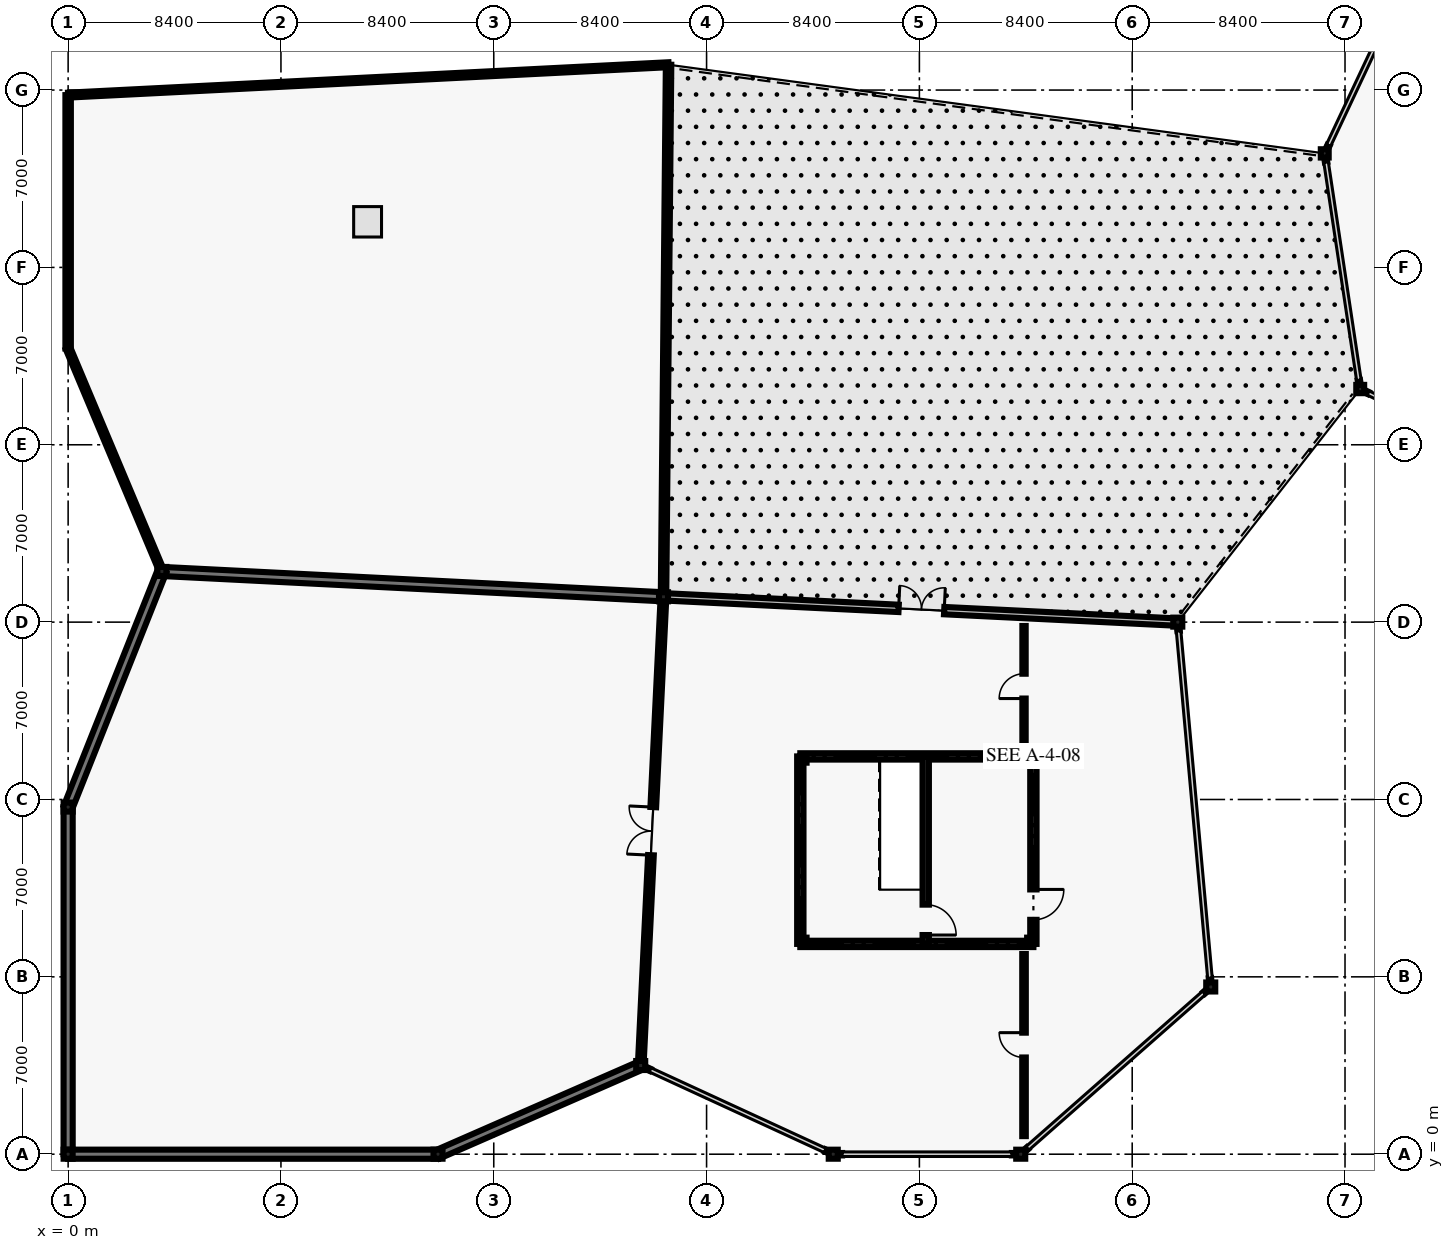
"""IFC4 building model, lengths in metres.
Left out: names, types, materials, properties, quantities, classifications, styles, units other than length and angle.
Written with IfcOpenShell. Run it as: python <this file> out.ifc"""

import sys

from ifc_helpers import new_model, si_unit, direction, frame, frame_2d, origin, origin_2d, place, context, subcontext, project, spatial, rectangle, hollow_circle, i_section, extrude, element, fill, save


model = new_model("IFC4")
c1 = context("Model", 3, precision=1e-05, world=origin(), true_north=direction((0.0, 1.0)))
c2 = subcontext(c1, "Body", "Model", "MODEL_VIEW")
j1 = project(units=[si_unit("LENGTHUNIT", "METRE"), si_unit("PLANEANGLEUNIT", "RADIAN")], contexts=[c1])
p1 = place(None, origin())
s1 = spatial("IfcSite", under=j1, at=p1, CompositionType="ELEMENT")
p2 = place(p1, origin())
s2 = spatial("IfcBuilding", under=s1, at=p2, CompositionType="ELEMENT")
p3 = place(p2, frame((0.0, 0.0, 10.2)))
s3 = spatial("IfcBuildingStorey", under=s2, at=p3, CompositionType="ELEMENT", Elevation=10.2)
for number, where, z_axis, x_axis in (
    (1, (0.0, 0.0, 0.0), (0.0, 0.0, 1.0), (1.0, 0.0, 0.0)),
    (2, (0.0, 13.7, 0.0), (0.0, 0.0, 1.0), (1.0, 0.0, 0.0)),
    (3, (3.7, 23.0, 0.0), (0.0, 0.0, 1.0), (1.0, 0.0, 0.0)),
    (4, (14.6, 0.0, 0.0), (0.0, 0.0, 1.0), (1.0, 0.0, 0.0)),
    (5, (22.6, 3.5, 0.0), (0.0, 0.0, 1.0), (1.0, 0.0, 0.0)),
    (6, (23.5, 22.0, 0.0), (0.0, 0.0, 1.0), (1.0, 0.0, 0.0)),
    (7, (30.2, 0.0, 0.0), (0.0, 0.0, 1.0), (1.0, 0.0, 0.0)),
    (8, (37.6, 0.0, 0.0), (0.0, 0.0, 1.0), (1.0, 0.0, 0.0)),
    (9, (43.8, 21.0, 0.0), (0.0, 0.0, 1.0), (1.0, 0.0, 0.0)),
    (10, (45.1, 6.6, 0.0), (0.0, 0.0, 1.0), (1.0, 0.0, 0.0)),
):
    element("IfcColumn", number, at=place(p3, frame(where, z_axis=z_axis, x_axis=x_axis)), inside=s3, PredefinedType="COLUMN", context=c2, shape_type="SweptSolid", body=[
        extrude(hollow_circle(Radius=0.178, WallThickness=0.013, at=origin_2d()), origin(), (0.0, 0.0, 1.0), 4.8),
    ])
for number, where, z_axis, x_axis in (
    (11, (49.6, 39.5, 0.0), (0.0, 0.0, 1.0), (1.0, 0.0, 0.0)),
    (12, (51.0, 30.2, 0.0), (0.0, 0.0, 1.0), (1.0, 0.0, 0.0)),
):
    element("IfcColumn", number, at=place(p3, frame(where, z_axis=z_axis, x_axis=x_axis)), inside=s3, PredefinedType="COLUMN", context=c2, shape_type="SweptSolid", body=[
        extrude(i_section(OverallWidth=0.311, OverallDepth=0.327, WebThickness=0.016, FlangeThickness=0.025, FilletRadius=0.017, at=origin_2d()), origin(), (0.0, 0.0, 1.0), 4.8),
    ])
for number, where, z_axis, x_axis in (
    (13, (29.02, 8.42, 0.0), (0.0, 0.0, 1.0), (1.0, 0.0, 0.0)),
    (14, (37.98, 8.42, 0.0), (0.0, 0.0, 1.0), (1.0, 0.0, 0.0)),
    (15, (37.98, 15.58, 0.0), (0.0, 0.0, 1.0), (1.0, 0.0, 0.0)),
    (16, (29.02, 15.58, 0.0), (0.0, 0.0, 1.0), (1.0, 0.0, 0.0)),
):
    element("IfcColumn", number, at=place(p3, frame(where, z_axis=z_axis, x_axis=x_axis)), inside=s3, PredefinedType="COLUMN", context=c2, shape_type="SweptSolid", body=[
        extrude(i_section(OverallWidth=0.254, OverallDepth=0.254, WebThickness=0.009, FlangeThickness=0.014, FilletRadius=0.013, at=origin_2d()), origin(), (0.0, 0.0, 1.0), 4.8),
    ])
for number, where, z_axis, x_axis in (
    (17, (50.994, 30.242, 0.0), (0.0, 0.0, 1.0), (-0.149, 0.989, 0.0)),
    (18, (49.652, 39.154, 0.0), (0.0, 0.0, 1.0), (-0.15, 0.989, 0.0)),
):
    element("IfcWall", number, at=place(p3, frame(where, z_axis=z_axis, x_axis=x_axis)), inside=s3, PredefinedType="SOLIDWALL", context=c2, shape_type="SweptSolid", body=[
        extrude(rectangle(XDim=0.307, YDim=0.095, at=frame_2d((0.154, 0.0))), origin(), (0.0, 0.0, 1.0), 3.62),
    ])
p4 = place(p3, frame((51.314, 30.045, 0.0), z_axis=(0.0, 0.0, 1.0), x_axis=(-0.896952807524, 0.44212629539, 0.0)))
e19 = element("IfcWall", 19, at=p4, inside=s3, PredefinedType="SOLIDWALL", context=c2, shape_type="SweptSolid", body=[
    extrude(rectangle(XDim=0.308, YDim=0.095, at=frame_2d((0.154, 0.0))), origin(), (0.0, 0.0, 1.0), 3.62),
])
p5 = place(p3, frame((49.618, 39.538, 0.0), z_axis=(0.0, 0.0, 1.0), x_axis=(0.425529884469, 0.904944372558, 0.0)))
e20 = element("IfcWall", 20, at=p5, inside=s3, PredefinedType="SOLIDWALL", context=c2, shape_type="SweptSolid", body=[
    extrude(rectangle(XDim=0.308, YDim=0.095, at=frame_2d((0.154, 0.0))), origin(), (0.0, 0.0, 1.0), 3.62),
])
p6 = place(p3, frame((3.7, 23.0, 0.0), z_axis=(0.0, 0.0, 1.0), x_axis=(0.998726796939, -0.050445862825, 0.0)))
e21 = element("IfcWall", 21, at=p6, inside=s3, PredefinedType="SOLIDWALL", context=c2, shape_type="SweptSolid", body=[
    extrude(rectangle(XDim=19.765, YDim=0.36, at=frame_2d((9.883, 0.0))), origin(), (0.0, 0.0, 1.0), 3.62),
])
p7 = place(p3, frame((0.0, 13.7, 0.0), z_axis=(0.0, 0.0, 1.0), x_axis=(0.369661561468, 0.929166470538, 0.0)))
e22 = element("IfcWall", 22, at=p7, inside=s3, PredefinedType="SOLIDWALL", context=c2, shape_type="SweptSolid", body=[
    extrude(rectangle(XDim=10.009, YDim=0.36, at=frame_2d((5.004, 0.0))), origin(), (0.0, 0.0, 1.0), 3.62),
])
p8 = place(p3, frame((0.0, 0.0, 0.0), z_axis=(0.0, 0.0, 1.0), x_axis=(0.0, 1.0, 0.0)))
e23 = element("IfcWall", 23, at=p8, inside=s3, PredefinedType="SOLIDWALL", context=c2, shape_type="SweptSolid", body=[
    extrude(rectangle(XDim=13.7, YDim=0.36, at=frame_2d((6.85, 0.0))), origin(), (0.0, 0.0, 1.0), 3.62),
])
p9 = place(p3, frame((14.6, 0.0, 0.0), z_axis=(0.0, 0.0, 1.0), x_axis=(-1.0, 0.0, 0.0)))
e24 = element("IfcWall", 24, at=p9, inside=s3, PredefinedType="SOLIDWALL", context=c2, shape_type="SweptSolid", body=[
    extrude(rectangle(XDim=14.6, YDim=0.36, at=frame_2d((7.3, 0.0))), origin(), (0.0, 0.0, 1.0), 3.62),
])
p10 = place(p3, frame((22.545, 3.476, 0.0), z_axis=(0.0, 0.0, 1.0), x_axis=(-0.916148288852, -0.400839510069, 0.0)))
e25 = element("IfcWall", 25, at=p10, inside=s3, PredefinedType="SOLIDWALL", context=c2, shape_type="SweptSolid", body=[
    extrude(rectangle(XDim=8.672, YDim=0.36, at=frame_2d((4.336, 0.0))), origin(), (0.0, 0.0, 1.0), 3.62),
])
for number, where, z_axis, x_axis in (
    (26, (30.162, 0.018, 0.0), (0.0, 0.0, 1.0), (-0.91, 0.416, 0.0)),
    (27, (22.972, 3.329, 0.0), (0.0, 0.0, 1.0), (-0.91, 0.416, 0.0)),
):
    element("IfcWall", number, at=place(p3, frame(where, z_axis=z_axis, x_axis=x_axis)), inside=s3, PredefinedType="SOLIDWALL", context=c2, shape_type="SweptSolid", body=[
        extrude(rectangle(XDim=0.308, YDim=0.095, at=frame_2d((0.154, 0.0))), origin(), (0.0, 0.0, 1.0), 3.62),
    ])
for number, where, z_axis, x_axis in (
    (28, (37.558, 0.0, 0.0), (0.0, 0.0, 1.0), (-1.0, 0.0, 0.0)),
    (29, (30.55, 0.0, 0.0), (0.0, 0.0, 1.0), (-1.0, 0.0, 0.0)),
):
    element("IfcWall", number, at=place(p3, frame(where, z_axis=z_axis, x_axis=x_axis)), inside=s3, PredefinedType="SOLIDWALL", context=c2, shape_type="SweptSolid", body=[
        extrude(rectangle(XDim=0.308, YDim=0.095, at=frame_2d((0.154, 0.0))), origin(), (0.0, 0.0, 1.0), 3.62),
    ])
p11 = place(p3, frame((45.068, 6.572, 0.0), z_axis=(0.0, 0.0, 1.0), x_axis=(-0.75124833206, -0.660019653932, 0.0)))
e30 = element("IfcWall", 30, at=p11, inside=s3, PredefinedType="SOLIDWALL", context=c2, shape_type="SweptSolid", body=[
    extrude(rectangle(XDim=0.308, YDim=0.095, at=frame_2d((0.154, 0.0))), origin(), (0.0, 0.0, 1.0), 3.62),
])
p12 = place(p3, frame((37.863, 0.231, 0.0), z_axis=(0.0, 0.0, 1.0), x_axis=(-0.751296149946, -0.659965222627, 0.0)))
e31 = element("IfcWall", 31, at=p12, inside=s3, PredefinedType="SOLIDWALL", context=c2, shape_type="SweptSolid", body=[
    extrude(rectangle(XDim=0.307, YDim=0.095, at=frame_2d((0.154, 0.0))), origin(), (0.0, 0.0, 1.0), 3.62),
])
p13 = place(p3, frame((43.804, 20.958, 0.0), z_axis=(0.0, 0.0, 1.0), x_axis=(0.087893810296, -0.996129850025, 0.0)))
e32 = element("IfcWall", 32, at=p13, inside=s3, PredefinedType="SOLIDWALL", context=c2, shape_type="SweptSolid", body=[
    extrude(rectangle(XDim=0.308, YDim=0.095, at=frame_2d((0.154, 0.0))), origin(), (0.0, 0.0, 1.0), 3.62),
])
p14 = place(p3, frame((45.069, 6.949, 0.0), z_axis=(0.0, 0.0, 1.0), x_axis=(0.087176781459, -0.996192857219, 0.0)))
e33 = element("IfcWall", 33, at=p14, inside=s3, PredefinedType="SOLIDWALL", context=c2, shape_type="SweptSolid", body=[
    extrude(rectangle(XDim=0.308, YDim=0.095, at=frame_2d((0.154, 0.0))), origin(), (0.0, 0.0, 1.0), 3.62),
])
p15 = place(p3, frame((23.56, 21.997, 0.0), z_axis=(0.0, 0.0, 1.0), x_axis=(0.998788812439, -0.049202724992, 0.0)))
e34 = element("IfcWall", 34, at=p15, inside=s3, PredefinedType="SOLIDWALL", context=c2, shape_type="SweptSolid", body=[
    extrude(rectangle(XDim=20.265, YDim=0.29, at=frame_2d((10.132, 0.0))), origin(), (0.0, 0.0, 1.0), 3.62),
])
p16 = place(p15, frame((9.232, 0.0, 0.0)))
e35 = element("IfcOpeningElement", 35, at=p16, cuts=e34, PredefinedType="OPENING", context=c2, shape_type="SweptSolid", body=[
    extrude(rectangle(XDim=1.8, YDim=2.25, at=frame_2d((0.9, 1.125))), frame((0.0, 0.155, 0.0), z_axis=(0.0, -1.0, 0.0), x_axis=(1.0, 0.0, 0.0)), (0.0, 0.0, 1.0), 0.31),
])
p17 = place(p3, frame((23.7, 43.0, 0.0), z_axis=(0.0, 0.0, 1.0), x_axis=(-0.998720712235, -0.050566183885, 0.0)))
e36 = element("IfcWall", 36, at=p17, inside=s3, PredefinedType="PARAPET", context=c2, shape_type="SweptSolid", body=[
    extrude(rectangle(XDim=23.73, YDim=0.195, at=frame_2d((11.865, 0.0))), origin(), (0.0, 0.0, 1.0), 0.95),
])
p18 = place(p3, frame((0.0, 41.8, 0.0), z_axis=(0.0, 0.0, 1.0), x_axis=(0.0, -1.0, 0.0)))
e37 = element("IfcWall", 37, at=p18, inside=s3, PredefinedType="PARAPET", context=c2, shape_type="SweptSolid", body=[
    extrude(rectangle(XDim=10.0, YDim=0.215, at=frame_2d((5.0, 0.0))), origin(), (0.0, 0.0, 1.0), 0.95),
])
p19 = place(p3, frame((0.0, 31.8, 0.0), z_axis=(0.0, 0.0, 1.0), x_axis=(0.387558181878, -0.921845244962, 0.0)))
e38 = element("IfcWall", 38, at=p19, inside=s3, PredefinedType="PARAPET", context=c2, shape_type="SweptSolid", body=[
    extrude(rectangle(XDim=9.366, YDim=0.195, at=frame_2d((4.683, 0.0))), origin(), (0.0, 0.0, 1.0), 0.95),
])
p20 = place(p3, frame((23.502, 22.18, 0.0), z_axis=(0.0, 0.0, 1.0), x_axis=(0.009509531412, 0.999954783384, 0.0)))
e39 = element("IfcWall", 39, at=p20, inside=s3, PredefinedType="PARAPET", context=c2, shape_type="SweptSolid", body=[
    extrude(rectangle(XDim=20.821, YDim=0.215, at=frame_2d((10.411, 0.0))), origin(), (0.0, 0.0, 1.0), 0.95),
])
p21 = place(p3, frame((22.6, 3.5, 0.0), z_axis=(0.0, 0.0, 1.0), x_axis=(0.048585922438, 0.998819006698, 0.0)))
e40 = element("IfcWall", 40, at=p21, inside=s3, PredefinedType="SOLIDWALL", context=c2, shape_type="SweptSolid", body=[
    extrude(rectangle(XDim=18.522, YDim=0.225, at=frame_2d((9.261, 0.0))), origin(), (0.0, 0.0, 1.0), 4.02),
])
p22 = place(p21, frame((8.311, 0.0, 0.0)))
e41 = element("IfcOpeningElement", 41, at=p22, cuts=e40, PredefinedType="OPENING", context=c2, shape_type="SweptSolid", body=[
    extrude(rectangle(XDim=1.9, YDim=2.35, at=frame_2d((0.95, 1.175))), frame((0.0, 0.123, 0.0), z_axis=(0.0, -1.0, 0.0), x_axis=(1.0, 0.0, 0.0)), (0.0, 0.0, 1.0), 0.245),
])
p23 = place(p3, frame((37.73, 0.714, 0.0), z_axis=(0.0, 0.0, 1.0), x_axis=(0.0, 1.0, 0.0)))
e42 = element("IfcWall", 42, at=p23, inside=s3, PredefinedType="PARTITIONING", context=c2, shape_type="SweptSolid", body=[
    extrude(rectangle(XDim=7.186, YDim=0.14, at=frame_2d((3.593, 0.0))), origin(), (0.0, 0.0, 1.0), 3.32),
])
p24 = place(p23, frame((3.103, 0.0, 0.0)))
e43 = element("IfcOpeningElement", 43, at=p24, cuts=e42, PredefinedType="OPENING", context=c2, shape_type="SweptSolid", body=[
    extrude(rectangle(XDim=0.98, YDim=2.15, at=frame_2d((0.49, 1.075))), frame((0.0, 0.08, 0.0), z_axis=(0.0, -1.0, 0.0), x_axis=(1.0, 0.0, 0.0)), (0.0, 0.0, 1.0), 0.16),
])
p25 = place(p3, frame((37.73, 16.1, 0.0), z_axis=(0.0, 0.0, 1.0), x_axis=(0.0, 1.0, 0.0)))
e44 = element("IfcWall", 44, at=p25, inside=s3, PredefinedType="PARTITIONING", context=c2, shape_type="SweptSolid", body=[
    extrude(rectangle(XDim=4.748, YDim=0.13, at=frame_2d((2.374, 0.0))), origin(), (0.0, 0.0, 1.0), 3.32),
])
p26 = place(p25, frame((1.884, 0.0, 0.0)))
e45 = element("IfcOpeningElement", 45, at=p26, cuts=e44, PredefinedType="OPENING", context=c2, shape_type="SweptSolid", body=[
    extrude(rectangle(XDim=0.98, YDim=2.15, at=frame_2d((0.49, 1.075))), frame((0.0, 0.075, 0.0), z_axis=(0.0, -1.0, 0.0), x_axis=(1.0, 0.0, 0.0)), (0.0, 0.0, 1.0), 0.15),
])
p27 = place(p3, frame((28.9, 8.3, 0.0), z_axis=(0.0, 0.0, 1.0), x_axis=(0.0, 1.0, 0.0)))
e46 = element("IfcWall", 46, at=p27, inside=s3, PredefinedType="SHEAR", context=c2, shape_type="SweptSolid", body=[
    extrude(rectangle(XDim=7.4, YDim=0.25, at=frame_2d((3.7, 0.0))), origin(), (0.0, 0.0, 1.0), 4.56),
])
for number, where, z_axis, x_axis in (
    (47, (28.9, 15.7, 0.0), (0.0, 0.0, 1.0), (1.0, 0.0, 0.0)),
    (48, (38.1, 8.3, 0.0), (0.0, 0.0, 1.0), (-1.0, 0.0, 0.0)),
):
    element("IfcWall", number, at=place(p3, frame(where, z_axis=z_axis, x_axis=x_axis)), inside=s3, PredefinedType="SHEAR", context=c2, shape_type="SweptSolid", body=[
        extrude(rectangle(XDim=9.2, YDim=0.25, at=frame_2d((4.6, 0.0))), origin(), (0.0, 0.0, 1.0), 4.56),
    ])
p28 = place(p3, frame((38.1, 15.7, 0.0), z_axis=(0.0, 0.0, 1.0), x_axis=(0.0, -1.0, 0.0)))
e49 = element("IfcWall", 49, at=p28, inside=s3, PredefinedType="SHEAR", context=c2, shape_type="SweptSolid", body=[
    extrude(rectangle(XDim=7.4, YDim=0.25, at=frame_2d((3.7, 0.0))), origin(), (0.0, 0.0, 1.0), 4.56),
])
p29 = place(p28, frame((5.25, 0.0, 0.0)))
e50 = element("IfcOpeningElement", 50, at=p29, cuts=e49, PredefinedType="OPENING", context=c2, shape_type="SweptSolid", body=[
    extrude(rectangle(XDim=1.2, YDim=2.2, at=frame_2d((0.6, 1.1))), frame((0.0, 0.135, 0.0), z_axis=(0.0, -1.0, 0.0), x_axis=(1.0, 0.0, 0.0)), (0.0, 0.0, 1.0), 0.27),
])
p30 = place(p3, frame((33.85, 15.7, 0.0), z_axis=(0.0, 0.0, 1.0), x_axis=(0.0, -1.0, 0.0)))
e51 = element("IfcWall", 51, at=p30, inside=s3, PredefinedType="SHEAR", context=c2, shape_type="SweptSolid", body=[
    extrude(rectangle(XDim=7.4, YDim=0.25, at=frame_2d((3.7, 0.0))), origin(), (0.0, 0.0, 1.0), 4.56),
])
p31 = place(p30, frame((5.85, 0.0, 0.0)))
e52 = element("IfcOpeningElement", 52, at=p31, cuts=e51, PredefinedType="OPENING", context=c2, shape_type="SweptSolid", body=[
    extrude(rectangle(XDim=1.2, YDim=2.2, at=frame_2d((0.6, 1.1))), frame((0.0, 0.135, 0.0), z_axis=(0.0, -1.0, 0.0), x_axis=(1.0, 0.0, 0.0)), (0.0, 0.0, 1.0), 0.27),
])
p32 = place(p16, origin())
e53 = element("IfcDoor", 53, at=p32, inside=s3, OperationType="DOUBLE_DOOR_SINGLE_SWING", PredefinedType="DOOR", context=c2, shape_type="SweptSolid", body=[
    extrude(rectangle(XDim=1.8, YDim=2.25, at=frame_2d((0.9, 1.125))), frame((0.0, 0.025, 0.0), z_axis=(0.0, -1.0, 0.0), x_axis=(1.0, 0.0, 0.0)), (0.0, 0.0, 1.0), 0.05),
])
fill(e35, e53)
p33 = place(p3, frame((0.0, 0.0, -0.23)))
p34 = place(p33, frame((11.82, 36.8, 0.0)))
p35 = place(p34, frame((0.0, 0.0, 0.18)))
e54 = element("IfcDoor", 54, at=p35, inside=s3, OperationType="SINGLE_SWING_LEFT", PredefinedType="TRAPDOOR", context=c2, shape_type="SweptSolid", body=[
    extrude(rectangle(XDim=1.1, YDim=1.2, at=origin_2d()), origin(), (0.0, 0.0, 1.0), 0.05),
])
p36 = place(p22, origin())
e55 = element("IfcDoor", 55, at=p36, inside=s3, OperationType="DOUBLE_DOOR_SINGLE_SWING", PredefinedType="DOOR", context=c2, shape_type="SweptSolid", body=[
    extrude(rectangle(XDim=1.9, YDim=2.35, at=frame_2d((0.95, 1.175))), frame((0.0, 0.025, 0.0), z_axis=(0.0, -1.0, 0.0), x_axis=(1.0, 0.0, 0.0)), (0.0, 0.0, 1.0), 0.05),
])
fill(e41, e55)
p37 = place(p24, origin())
e56 = element("IfcDoor", 56, at=p37, inside=s3, OperationType="SINGLE_SWING_RIGHT", PredefinedType="DOOR", context=c2, shape_type="SweptSolid", body=[
    extrude(rectangle(XDim=0.98, YDim=2.15, at=frame_2d((0.49, 1.075))), frame((0.0, 0.025, 0.0), z_axis=(0.0, -1.0, 0.0), x_axis=(1.0, 0.0, 0.0)), (0.0, 0.0, 1.0), 0.05),
])
fill(e43, e56)
p38 = place(p26, origin())
e57 = element("IfcDoor", 57, at=p38, inside=s3, OperationType="SINGLE_SWING_LEFT", PredefinedType="DOOR", context=c2, shape_type="SweptSolid", body=[
    extrude(rectangle(XDim=0.98, YDim=2.15, at=frame_2d((0.49, 1.075))), frame((0.0, 0.025, 0.0), z_axis=(0.0, -1.0, 0.0), x_axis=(1.0, 0.0, 0.0)), (0.0, 0.0, 1.0), 0.05),
])
fill(e45, e57)
p39 = place(p29, origin())
e58 = element("IfcDoor", 58, at=p39, inside=s3, OperationType="SINGLE_SWING_LEFT", PredefinedType="DOOR", context=c2, shape_type="SweptSolid", body=[
    extrude(rectangle(XDim=1.2, YDim=2.2, at=frame_2d((0.6, 1.1))), frame((0.0, 0.025, 0.0), z_axis=(0.0, -1.0, 0.0), x_axis=(1.0, 0.0, 0.0)), (0.0, 0.0, 1.0), 0.05),
])
fill(e50, e58)
p40 = place(p31, origin())
e59 = element("IfcDoor", 59, at=p40, inside=s3, OperationType="SINGLE_SWING_RIGHT", PredefinedType="DOOR", context=c2, shape_type="SweptSolid", body=[
    extrude(rectangle(XDim=1.2, YDim=2.2, at=frame_2d((0.6, 1.1))), frame((0.0, 0.025, 0.0), z_axis=(0.0, -1.0, 0.0), x_axis=(1.0, 0.0, 0.0)), (0.0, 0.0, 1.0), 0.05),
])
fill(e52, e59)
save(model, sys.argv[1])
